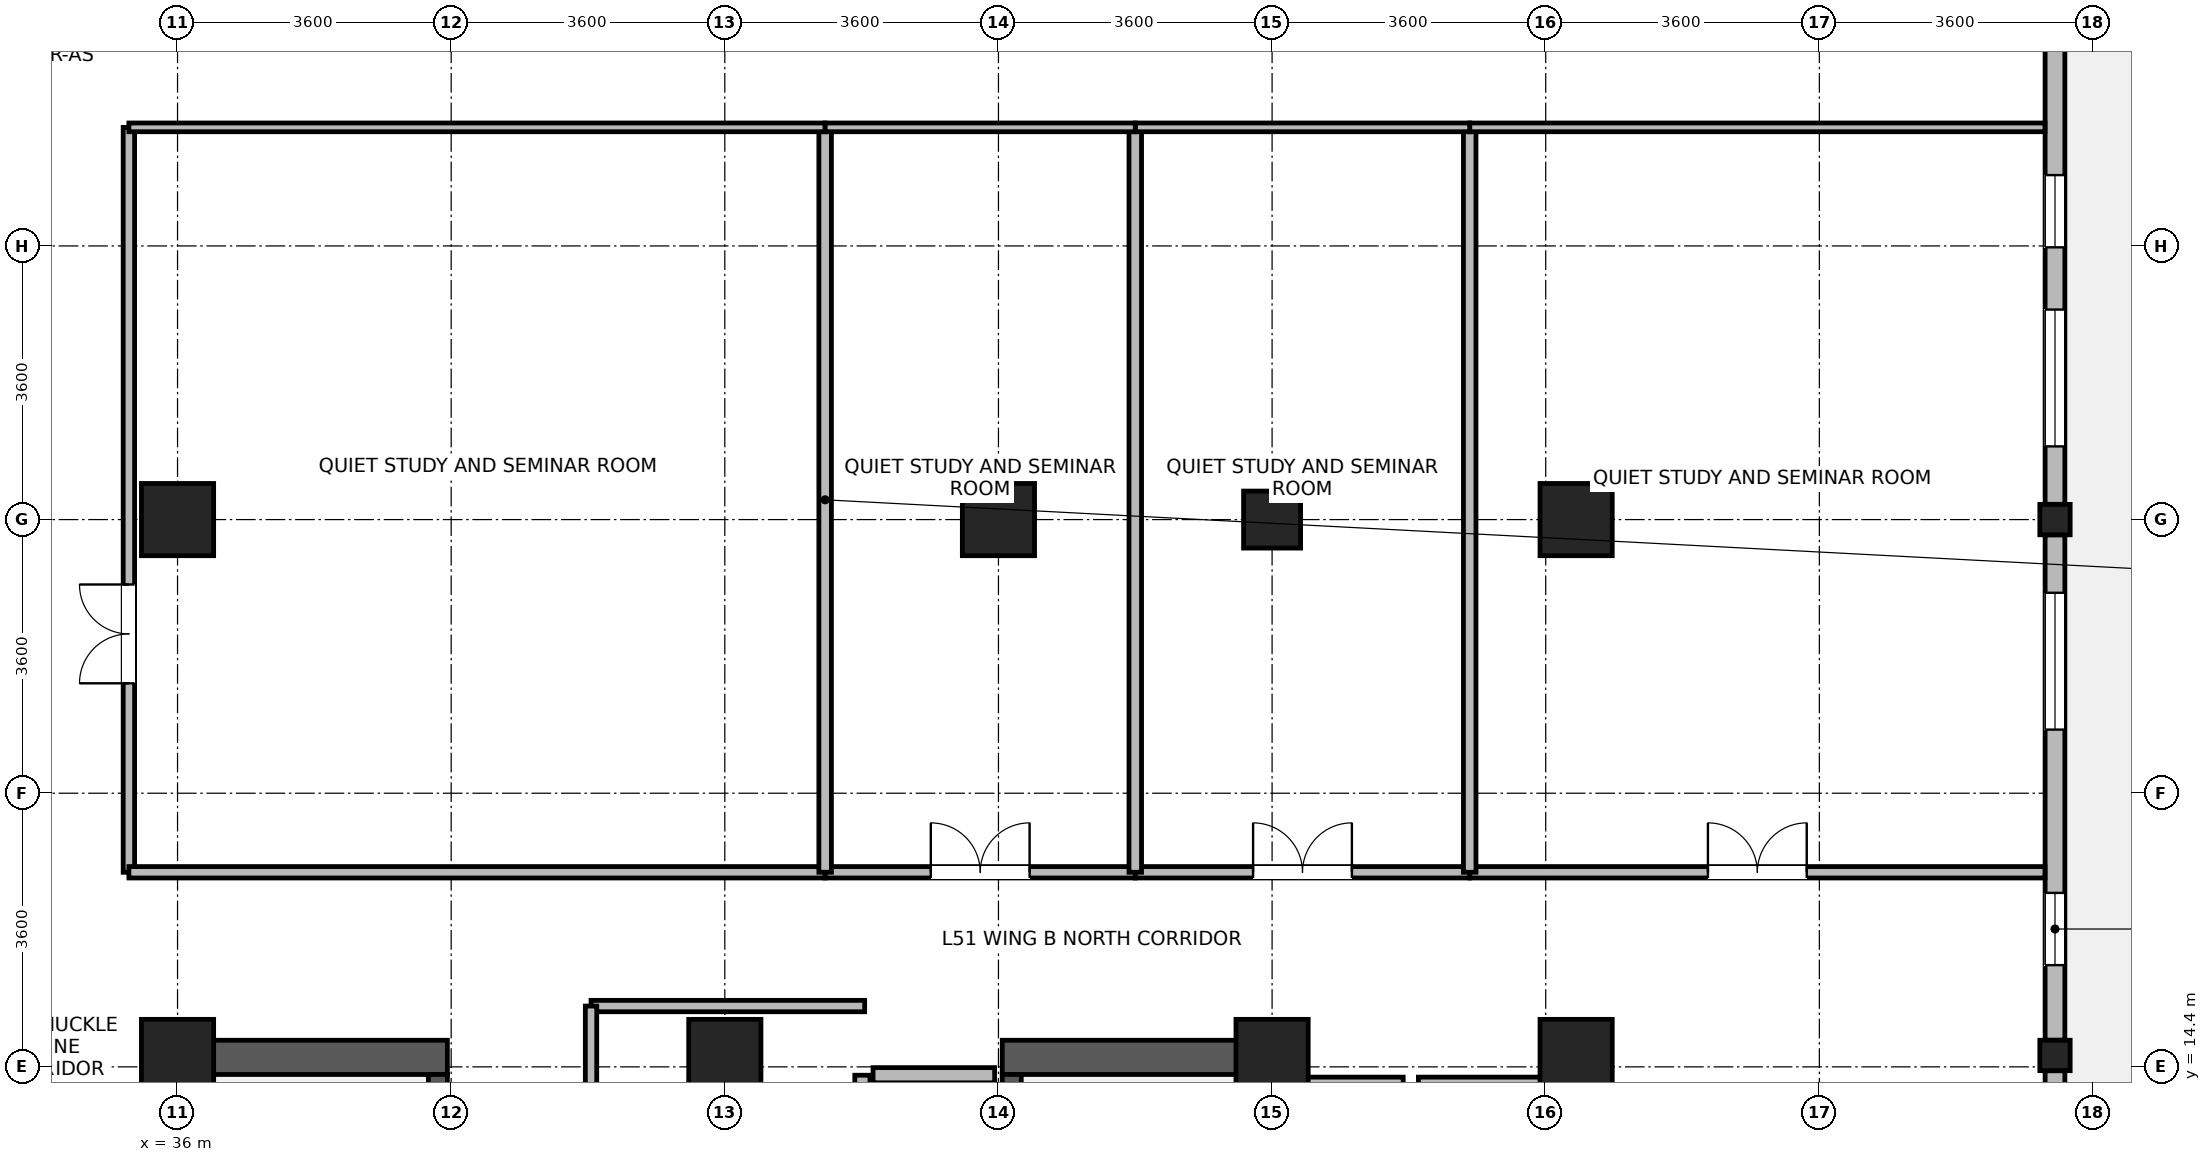
"""IFC4 building model, lengths in metres.
Left out: names, types, materials, properties, quantities, classifications, styles, units other than length and angle.
Written with IfcOpenShell. Run it as: python <this file> out.ifc"""

import sys

from ifc_helpers import new_model, si_unit, direction, frame, frame_2d, origin, origin_2d, place, context, subcontext, project, spatial, rectangle, i_section, extrude, source, transform, mapped, element, fill, save


model = new_model("IFC4")
c1 = context("Model", 3, precision=1e-05, world=origin(), true_north=direction((0.0, 1.0)))
c2 = subcontext(c1, "Body", "Model", "MODEL_VIEW")
j1 = project(units=[si_unit("LENGTHUNIT", "METRE"), si_unit("PLANEANGLEUNIT", "RADIAN")], contexts=[c1])
p1 = place(None, origin())
s1 = spatial("IfcSite", under=j1, at=p1, CompositionType="ELEMENT")
p2 = place(p1, origin())
s2 = spatial("IfcBuilding", under=s1, at=p2, CompositionType="ELEMENT")
p3 = place(p2, frame((0.0, 0.0, 201.8)))
s3 = spatial("IfcBuildingStorey", under=s2, at=p3, CompositionType="ELEMENT", Elevation=201.8)
for number, where, z_axis, x_axis in (
    (1, (36.125, 6.85, 0.0), (0.0, 0.0, 1.0), (0.0, 1.0, 0.0)),
    (2, (50.275, 6.85, 0.0), (0.0, 0.0, 1.0), (0.0, 1.0, 0.0)),
):
    element("IfcWall", number, at=place(p3, frame(where, z_axis=z_axis, x_axis=x_axis)), inside=s3, PredefinedType="SHEAR", context=c2, shape_type="SweptSolid", body=[
        extrude(rectangle(XDim=7.9, YDim=0.45, at=frame_2d((3.95, 0.0))), origin(), (0.0, 0.0, 1.0), 3.47),
    ])
for number, where, z_axis, x_axis in (
    (3, (36.35, 14.525, 0.0), (0.0, 0.0, 1.0), (1.0, 0.0, 0.0)),
    (4, (46.85, 14.525, 0.0), (0.0, 0.0, 1.0), (1.0, 0.0, 0.0)),
):
    element("IfcWall", number, at=place(p3, frame(where, z_axis=z_axis, x_axis=x_axis)), inside=s3, PredefinedType="SHEAR", context=c2, shape_type="SweptSolid", body=[
        extrude(rectangle(XDim=3.2, YDim=0.45, at=frame_2d((1.6, 0.0))), origin(), (0.0, 0.0, 1.0), 3.47),
    ])
p4 = place(p3, frame((39.425, 7.3, 0.0), z_axis=(0.0, 0.0, 1.0), x_axis=(0.0, 1.0, 0.0)))
e5 = element("IfcWall", 5, at=p4, inside=s3, PredefinedType="SHEAR", context=c2, shape_type="SweptSolid", body=[
    extrude(rectangle(XDim=7.0, YDim=0.25, at=frame_2d((3.5, 0.0))), origin(), (0.0, 0.0, 1.0), 3.47),
])
p5 = place(p4, frame((0.15, 0.0, 0.0)))
e6 = element("IfcOpeningElement", 6, at=p5, cuts=e5, PredefinedType="OPENING", context=c2, shape_type="SweptSolid", body=[
    extrude(rectangle(XDim=1.1, YDim=2.08, at=frame_2d((0.55, 1.04))), frame((0.0, 0.135, 0.0), z_axis=(0.0, -1.0, 0.0), x_axis=(1.0, 0.0, 0.0)), (0.0, 0.0, 1.0), 0.27),
])
p6 = place(p3, frame((46.975, 7.3, 0.0), z_axis=(0.0, 0.0, 1.0), x_axis=(0.0, 1.0, 0.0)))
e7 = element("IfcWall", 7, at=p6, inside=s3, PredefinedType="SHEAR", context=c2, shape_type="SweptSolid", body=[
    extrude(rectangle(XDim=7.0, YDim=0.25, at=frame_2d((3.5, 0.0))), origin(), (0.0, 0.0, 1.0), 3.47),
])
p7 = place(p6, frame((0.15, 0.0, 0.0)))
e8 = element("IfcOpeningElement", 8, at=p7, cuts=e7, PredefinedType="OPENING", context=c2, shape_type="SweptSolid", body=[
    extrude(rectangle(XDim=1.1, YDim=2.08, at=frame_2d((0.55, 1.04))), frame((0.0, 0.135, 0.0), z_axis=(0.0, -1.0, 0.0), x_axis=(1.0, 0.0, 0.0)), (0.0, 0.0, 1.0), 0.27),
])
m1 = source(origin(), c2, "Body", "SweptSolid", [
    extrude(rectangle(XDim=0.95, YDim=0.95, at=origin_2d()), origin(), (0.0, 0.0, 1.0), 3.7),
])
for number, where, z_axis, x_axis in (
    (9, (36.0, 21.6, 0.0), (0.0, 0.0, 1.0), (1.0, 0.0, 0.0)),
    (10, (46.8, 21.6, 0.0), (0.0, 0.0, 1.0), (1.0, 0.0, 0.0)),
    (11, (36.0, 14.55, 0.0), (0.0, 0.0, 1.0), (1.0, 0.0, 0.0)),
    (12, (43.2, 14.55, 0.0), (0.0, 0.0, 1.0), (1.0, 0.0, 0.0)),
    (13, (50.4, 14.55, 0.0), (0.0, 0.0, 1.0), (1.0, 0.0, 0.0)),
):
    element("IfcColumn", number, at=place(p3, frame(where, z_axis=z_axis, x_axis=x_axis)), inside=s3, PredefinedType="COLUMN", context=c2, shape_type="MappedRepresentation", body=[
        mapped(m1, transform((0.0, 0.0, 0.0), x_axis=(1.0, 0.0, 0.0), y_axis=(0.0, 1.0, 0.0), z_axis=(0.0, 0.0, 1.0), scale=1.0)),
    ])
m2 = source(origin(), c2, "Body", "SweptSolid", [
    extrude(rectangle(XDim=0.75, YDim=0.75, at=origin_2d()), origin(), (0.0, 0.0, 1.0), 3.7),
])
p8 = place(p3, frame((50.4, 21.6, 0.0), z_axis=(0.0, 0.0, 1.0), x_axis=(1.0, 0.0, 0.0)))
e14 = element("IfcColumn", 14, at=p8, inside=s3, PredefinedType="PILASTER", context=c2, shape_type="MappedRepresentation", body=[
    mapped(m2, transform((0.0, 0.0, 0.0), x_axis=(1.0, 0.0, 0.0), y_axis=(0.0, 1.0, 0.0), z_axis=(0.0, 0.0, 1.0), scale=1.0)),
])
for number, where, z_axis, x_axis in (
    (15, (54.4, 14.55, 0.0), (0.0, 0.0, 1.0), (1.0, 0.0, 0.0)),
    (16, (54.4, 21.6, 0.0), (0.0, 0.0, 1.0), (1.0, 0.0, 0.0)),
):
    element("IfcColumn", number, at=place(p3, frame(where, z_axis=z_axis, x_axis=x_axis)), inside=s3, PredefinedType="COLUMN", context=c2, shape_type="MappedRepresentation", body=[
        mapped(m1, transform((0.0, 0.0, 0.0), x_axis=(1.0, 0.0, 0.0), y_axis=(0.0, 1.0, 0.0), z_axis=(0.0, 0.0, 1.0), scale=1.0)),
    ])
m3 = source(origin(), c2, "Body", "SweptSolid", [
    extrude(i_section(OverallWidth=0.399, OverallDepth=0.4, WebThickness=0.017, FlangeThickness=0.023, FilletRadius=0.015, at=origin_2d()), origin(), (0.0, 0.0, 1.0), 3.7),
])
for number, where, z_axis, x_axis in (
    (17, (60.7, 14.55, 0.0), (0.0, 0.0, 1.0), (1.0, 0.0, 0.0)),
    (18, (60.7, 21.6, 0.0), (0.0, 0.0, 1.0), (1.0, 0.0, 0.0)),
):
    element("IfcColumn", number, at=place(p3, frame(where, z_axis=z_axis, x_axis=x_axis)), inside=s3, PredefinedType="COLUMN", context=c2, shape_type="MappedRepresentation", body=[
        mapped(m3, transform((0.0, 0.0, 0.0), x_axis=(1.0, 0.0, 0.0), y_axis=(0.0, 1.0, 0.0), z_axis=(0.0, 0.0, 1.0), scale=1.0)),
    ])
p9 = place(p3, frame((60.7, 14.349, 0.0), z_axis=(0.0, 0.0, 1.0), x_axis=(0.0, -1.0, 0.0)))
e19 = element("IfcWall", 19, at=p9, inside=s3, PredefinedType="STANDARD", context=c2, shape_type="SweptSolid", body=[
    extrude(rectangle(XDim=7.098, YDim=0.26, at=frame_2d((3.549, 0.0))), origin(), (0.0, 0.0, 1.0), 3.0),
])
p10 = place(p9, frame((2.799, 0.0, 0.0)))
e20 = element("IfcOpeningElement", 20, at=p10, cuts=e19, PredefinedType="OPENING", context=c2, shape_type="SweptSolid", body=[
    extrude(rectangle(XDim=1.5, YDim=2.15, at=frame_2d((0.75, 1.075))), frame((0.0, 0.14, 0.0), z_axis=(0.0, -1.0, 0.0), x_axis=(1.0, 0.0, 0.0)), (0.0, 0.0, 1.0), 0.28),
])
p11 = place(p3, frame((60.7, 21.399, 0.0), z_axis=(0.0, 0.0, 1.0), x_axis=(0.0, -1.0, 0.0)))
e21 = element("IfcWall", 21, at=p11, inside=s3, PredefinedType="STANDARD", context=c2, shape_type="SweptSolid", body=[
    extrude(rectangle(XDim=6.648, YDim=0.26, at=frame_2d((3.324, 0.0))), origin(), (0.0, 0.0, 1.0), 3.0),
])
p12 = place(p11, frame((0.762, 0.0, 0.85)))
e22 = element("IfcOpeningElement", 22, at=p12, cuts=e21, PredefinedType="OPENING", context=c2, shape_type="SweptSolid", body=[
    extrude(rectangle(XDim=1.8, YDim=1.85, at=frame_2d((0.9, 0.925))), frame((0.0, 0.14, 0.0), z_axis=(0.0, -1.0, 0.0), x_axis=(1.0, 0.0, 0.0)), (0.0, 0.0, 1.0), 0.28),
])
p13 = place(p11, frame((4.71, 0.0, 0.85)))
e23 = element("IfcOpeningElement", 23, at=p13, cuts=e21, PredefinedType="OPENING", context=c2, shape_type="SweptSolid", body=[
    extrude(rectangle(XDim=0.95, YDim=1.75, at=frame_2d((0.475, 0.875))), frame((0.0, 0.14, 0.0), z_axis=(0.0, -1.0, 0.0), x_axis=(1.0, 0.0, 0.0)), (0.0, 0.0, 1.0), 0.28),
])
p14 = place(p3, frame((60.7, 28.449, 0.0), z_axis=(0.0, 0.0, 1.0), x_axis=(0.0, -1.0, 0.0)))
e24 = element("IfcWall", 24, at=p14, inside=s3, PredefinedType="STANDARD", context=c2, shape_type="SweptSolid", body=[
    extrude(rectangle(XDim=6.648, YDim=0.26, at=frame_2d((3.324, 0.0))), origin(), (0.0, 0.0, 1.0), 3.0),
])
p15 = place(p14, frame((4.086, 0.0, 0.85)))
e25 = element("IfcOpeningElement", 25, at=p15, cuts=e24, PredefinedType="OPENING", context=c2, shape_type="SweptSolid", body=[
    extrude(rectangle(XDim=1.8, YDim=1.85, at=frame_2d((0.9, 0.925))), frame((0.0, 0.14, 0.0), z_axis=(0.0, -1.0, 0.0), x_axis=(1.0, 0.0, 0.0)), (0.0, 0.0, 1.0), 0.28),
])
p16 = place(p14, frame((2.317, 0.0, 0.85)))
e26 = element("IfcOpeningElement", 26, at=p16, cuts=e24, PredefinedType="OPENING", context=c2, shape_type="SweptSolid", body=[
    extrude(rectangle(XDim=0.95, YDim=1.75, at=frame_2d((0.475, 0.875))), frame((0.0, 0.14, 0.0), z_axis=(0.0, -1.0, 0.0), x_axis=(1.0, 0.0, 0.0)), (0.0, 0.0, 1.0), 0.28),
])
p17 = place(p3, frame((50.475, 14.165, 0.0), z_axis=(0.0, 0.0, 1.0), x_axis=(1.0, 0.0, 0.0)))
e27 = element("IfcWall", 27, at=p17, inside=s3, PredefinedType="PARTITIONING", context=c2, shape_type="SweptSolid", body=[
    extrude(rectangle(XDim=1.65, YDim=0.2, at=frame_2d((0.825, 0.0))), origin(), (0.0, 0.0, 1.0), 3.45),
])
p18 = place(p3, frame((52.325, 14.165, 0.0), z_axis=(0.0, 0.0, 1.0), x_axis=(1.0, 0.0, 0.0)))
e28 = element("IfcWall", 28, at=p18, inside=s3, PredefinedType="PARTITIONING", context=c2, shape_type="SweptSolid", body=[
    extrude(rectangle(XDim=1.65, YDim=0.2, at=frame_2d((0.825, 0.0))), origin(), (0.0, 0.0, 1.0), 3.45),
])
p19 = place(p3, frame((45.15, 14.29, 0.0), z_axis=(0.0, 0.0, 1.0), x_axis=(1.0, 0.0, 0.0)))
e29 = element("IfcWall", 29, at=p19, inside=s3, PredefinedType="PARTITIONING", context=c2, shape_type="SweptSolid", body=[
    extrude(rectangle(XDim=1.6, YDim=0.2, at=frame_2d((0.8, 0.0))), origin(), (0.0, 0.0, 1.0), 2.45),
])
p20 = place(p3, frame((45.01, 11.61, 0.0), z_axis=(0.0, 0.0, 1.0), x_axis=(0.0, 1.0, 0.0)))
e30 = element("IfcWall", 30, at=p20, inside=s3, PredefinedType="PARTITIONING", context=c2, shape_type="SweptSolid", body=[
    extrude(rectangle(XDim=2.68, YDim=0.2, at=frame_2d((1.34, 0.0))), origin(), (0.0, 0.0, 1.0), 3.45),
])
p21 = place(p3, frame((35.36, 16.96, 0.0), z_axis=(0.0, 0.0, 1.0), x_axis=(0.0, 1.0, 0.0)))
e31 = element("IfcWall", 31, at=p21, inside=s3, PredefinedType="PARTITIONING", context=c2, shape_type="SweptSolid", body=[
    extrude(rectangle(XDim=9.8, YDim=0.15, at=frame_2d((4.9, 0.0))), origin(), (0.0, 0.0, 1.0), 3.45),
])
p22 = place(p21, frame((2.486, 0.0, 0.0)))
e32 = element("IfcOpeningElement", 32, at=p22, cuts=e31, PredefinedType="OPENING", context=c2, shape_type="SweptSolid", body=[
    extrude(rectangle(XDim=1.3, YDim=2.12, at=frame_2d((0.65, 1.06))), frame((0.0, 0.085, 0.0), z_axis=(0.0, -1.0, 0.0), x_axis=(1.0, 0.0, 0.0)), (0.0, 0.0, 1.0), 0.17),
])
p23 = place(p3, frame((35.36, 16.96, 0.0), z_axis=(0.0, 0.0, 1.0), x_axis=(1.0, 0.0, 0.0)))
e33 = element("IfcWall", 33, at=p23, inside=s3, PredefinedType="PARTITIONING", context=c2, shape_type="SweptSolid", body=[
    extrude(rectangle(XDim=9.16, YDim=0.15, at=frame_2d((4.58, 0.0))), origin(), (0.0, 0.0, 1.0), 3.45),
])
p24 = place(p3, frame((53.0, 16.96, 0.0), z_axis=(0.0, 0.0, 1.0), x_axis=(1.0, 0.0, 0.0)))
e34 = element("IfcWall", 34, at=p24, inside=s3, PredefinedType="PARTITIONING", context=c2, shape_type="SweptSolid", body=[
    extrude(rectangle(XDim=7.568, YDim=0.15, at=frame_2d((3.784, 0.0))), origin(), (0.0, 0.0, 1.0), 3.45),
])
p25 = place(p24, frame((3.134, 0.0, 0.0)))
e35 = element("IfcOpeningElement", 35, at=p25, cuts=e34, PredefinedType="OPENING", context=c2, shape_type="SweptSolid", body=[
    extrude(rectangle(XDim=1.3, YDim=2.12, at=frame_2d((0.65, 1.06))), frame((0.0, 0.085, 0.0), z_axis=(0.0, -1.0, 0.0), x_axis=(1.0, 0.0, 0.0)), (0.0, 0.0, 1.0), 0.17),
])
p26 = place(p3, frame((48.6, 16.96, 0.0), z_axis=(0.0, 0.0, 1.0), x_axis=(1.0, 0.0, 0.0)))
e36 = element("IfcWall", 36, at=p26, inside=s3, PredefinedType="PARTITIONING", context=c2, shape_type="SweptSolid", body=[
    extrude(rectangle(XDim=4.4, YDim=0.15, at=frame_2d((2.2, 0.0))), origin(), (0.0, 0.0, 1.0), 3.45),
])
p27 = place(p26, frame((1.55, 0.0, 0.0)))
e37 = element("IfcOpeningElement", 37, at=p27, cuts=e36, PredefinedType="OPENING", context=c2, shape_type="SweptSolid", body=[
    extrude(rectangle(XDim=1.3, YDim=2.12, at=frame_2d((0.65, 1.06))), frame((0.0, 0.085, 0.0), z_axis=(0.0, -1.0, 0.0), x_axis=(1.0, 0.0, 0.0)), (0.0, 0.0, 1.0), 0.17),
])
p28 = place(p3, frame((44.52, 16.96, 0.0), z_axis=(0.0, 0.0, 1.0), x_axis=(1.0, 0.0, 0.0)))
e38 = element("IfcWall", 38, at=p28, inside=s3, PredefinedType="PARTITIONING", context=c2, shape_type="SweptSolid", body=[
    extrude(rectangle(XDim=4.08, YDim=0.15, at=frame_2d((2.04, 0.0))), origin(), (0.0, 0.0, 1.0), 3.45),
])
p29 = place(p28, frame((1.39, 0.0, 0.0)))
e39 = element("IfcOpeningElement", 39, at=p29, cuts=e38, PredefinedType="OPENING", context=c2, shape_type="SweptSolid", body=[
    extrude(rectangle(XDim=1.3, YDim=2.12, at=frame_2d((0.65, 1.06))), frame((0.0, 0.085, 0.0), z_axis=(0.0, -1.0, 0.0), x_axis=(1.0, 0.0, 0.0)), (0.0, 0.0, 1.0), 0.17),
])
p30 = place(p3, frame((41.44, 15.2, 0.0), z_axis=(0.0, 0.0, 1.0), x_axis=(1.0, 0.0, 0.0)))
e40 = element("IfcWall", 40, at=p30, inside=s3, PredefinedType="PARTITIONING", context=c2, shape_type="SweptSolid", body=[
    extrude(rectangle(XDim=3.6, YDim=0.15, at=frame_2d((1.8, 0.0))), origin(), (0.0, 0.0, 1.0), 3.45),
])
p31 = place(p3, frame((41.44, 11.64, 0.0), z_axis=(0.0, 0.0, 1.0), x_axis=(0.0, 1.0, 0.0)))
e41 = element("IfcWall", 41, at=p31, inside=s3, PredefinedType="PARTITIONING", context=c2, shape_type="SweptSolid", body=[
    extrude(rectangle(XDim=3.56, YDim=0.15, at=frame_2d((1.78, 0.0))), origin(), (0.0, 0.0, 1.0), 3.45),
])
for number, where, z_axis, x_axis in (
    (42, (44.52, 16.96, 0.0), (0.0, 0.0, 1.0), (0.0, 1.0, 0.0)),
    (43, (48.6, 16.96, 0.0), (0.0, 0.0, 1.0), (0.0, 1.0, 0.0)),
    (44, (53.0, 16.96, 0.0), (0.0, 0.0, 1.0), (0.0, 1.0, 0.0)),
):
    element("IfcWall", number, at=place(p3, frame(where, z_axis=z_axis, x_axis=x_axis)), inside=s3, PredefinedType="PARTITIONING", context=c2, shape_type="SweptSolid", body=[
        extrude(rectangle(XDim=9.8, YDim=0.165, at=frame_2d((4.9, 0.0))), origin(), (0.0, 0.0, 1.0), 3.45),
    ])
p32 = place(p3, frame((35.36, 26.76, 0.0), z_axis=(0.0, 0.0, 1.0), x_axis=(1.0, 0.0, 0.0)))
e45 = element("IfcWall", 45, at=p32, inside=s3, PredefinedType="PARTITIONING", context=c2, shape_type="SweptSolid", body=[
    extrude(rectangle(XDim=9.16, YDim=0.115, at=frame_2d((4.58, 0.0))), origin(), (0.0, 0.0, 1.0), 3.45),
])
p33 = place(p3, frame((53.0, 26.76, 0.0), z_axis=(0.0, 0.0, 1.0), x_axis=(1.0, 0.0, 0.0)))
e46 = element("IfcWall", 46, at=p33, inside=s3, PredefinedType="PARTITIONING", context=c2, shape_type="SweptSolid", body=[
    extrude(rectangle(XDim=7.568, YDim=0.115, at=frame_2d((3.784, 0.0))), origin(), (0.0, 0.0, 1.0), 3.45),
])
p34 = place(p3, frame((48.6, 26.76, 0.0), z_axis=(0.0, 0.0, 1.0), x_axis=(1.0, 0.0, 0.0)))
e47 = element("IfcWall", 47, at=p34, inside=s3, PredefinedType="PARTITIONING", context=c2, shape_type="SweptSolid", body=[
    extrude(rectangle(XDim=4.4, YDim=0.115, at=frame_2d((2.2, 0.0))), origin(), (0.0, 0.0, 1.0), 3.45),
])
p35 = place(p3, frame((44.52, 26.76, 0.0), z_axis=(0.0, 0.0, 1.0), x_axis=(1.0, 0.0, 0.0)))
e48 = element("IfcWall", 48, at=p35, inside=s3, PredefinedType="PARTITIONING", context=c2, shape_type="SweptSolid", body=[
    extrude(rectangle(XDim=4.08, YDim=0.115, at=frame_2d((2.04, 0.0))), origin(), (0.0, 0.0, 1.0), 3.45),
])
p36 = place(p12, origin())
e49 = element("IfcWindow", 49, at=p36, inside=s3, PartitioningType="SINGLE_PANEL", PredefinedType="WINDOW", context=c2, shape_type="SweptSolid", body=[
    extrude(rectangle(XDim=1.8, YDim=1.85, at=frame_2d((0.9, 0.925))), frame((0.0, 0.03, 0.0), z_axis=(0.0, -1.0, 0.0), x_axis=(1.0, 0.0, 0.0)), (0.0, 0.0, 1.0), 0.06),
])
fill(e22, e49)
p37 = place(p13, origin())
e50 = element("IfcWindow", 50, at=p37, inside=s3, PartitioningType="SINGLE_PANEL", PredefinedType="WINDOW", context=c2, shape_type="SweptSolid", body=[
    extrude(rectangle(XDim=0.95, YDim=1.75, at=frame_2d((0.475, 0.875))), frame((0.0, 0.03, 0.0), z_axis=(0.0, -1.0, 0.0), x_axis=(1.0, 0.0, 0.0)), (0.0, 0.0, 1.0), 0.06),
])
fill(e23, e50)
p38 = place(p15, origin())
e51 = element("IfcWindow", 51, at=p38, inside=s3, PartitioningType="SINGLE_PANEL", PredefinedType="WINDOW", context=c2, shape_type="SweptSolid", body=[
    extrude(rectangle(XDim=1.8, YDim=1.85, at=frame_2d((0.9, 0.925))), frame((0.0, 0.03, 0.0), z_axis=(0.0, -1.0, 0.0), x_axis=(1.0, 0.0, 0.0)), (0.0, 0.0, 1.0), 0.06),
])
fill(e25, e51)
p39 = place(p16, origin())
e52 = element("IfcWindow", 52, at=p39, inside=s3, PartitioningType="SINGLE_PANEL", PredefinedType="WINDOW", context=c2, shape_type="SweptSolid", body=[
    extrude(rectangle(XDim=0.95, YDim=1.75, at=frame_2d((0.475, 0.875))), frame((0.0, 0.03, 0.0), z_axis=(0.0, -1.0, 0.0), x_axis=(1.0, 0.0, 0.0)), (0.0, 0.0, 1.0), 0.06),
])
fill(e26, e52)
p40 = place(p22, origin())
e53 = element("IfcDoor", 53, at=p40, inside=s3, OperationType="DOUBLE_DOOR_SINGLE_SWING", PredefinedType="DOOR", context=c2, shape_type="SweptSolid", body=[
    extrude(rectangle(XDim=1.3, YDim=2.12, at=frame_2d((0.65, 1.06))), frame((0.0, 0.025, 0.0), z_axis=(0.0, -1.0, 0.0), x_axis=(1.0, 0.0, 0.0)), (0.0, 0.0, 1.0), 0.05),
])
fill(e32, e53)
p41 = place(p25, origin())
e54 = element("IfcDoor", 54, at=p41, inside=s3, OperationType="DOUBLE_DOOR_SINGLE_SWING", PredefinedType="DOOR", context=c2, shape_type="SweptSolid", body=[
    extrude(rectangle(XDim=1.3, YDim=2.12, at=frame_2d((0.65, 1.06))), frame((0.0, 0.025, 0.0), z_axis=(0.0, -1.0, 0.0), x_axis=(1.0, 0.0, 0.0)), (0.0, 0.0, 1.0), 0.05),
])
fill(e35, e54)
p42 = place(p27, origin())
e55 = element("IfcDoor", 55, at=p42, inside=s3, OperationType="DOUBLE_DOOR_SINGLE_SWING", PredefinedType="DOOR", context=c2, shape_type="SweptSolid", body=[
    extrude(rectangle(XDim=1.3, YDim=2.12, at=frame_2d((0.65, 1.06))), frame((0.0, 0.025, 0.0), z_axis=(0.0, -1.0, 0.0), x_axis=(1.0, 0.0, 0.0)), (0.0, 0.0, 1.0), 0.05),
])
fill(e37, e55)
p43 = place(p29, origin())
e56 = element("IfcDoor", 56, at=p43, inside=s3, OperationType="DOUBLE_DOOR_SINGLE_SWING", PredefinedType="DOOR", context=c2, shape_type="SweptSolid", body=[
    extrude(rectangle(XDim=1.3, YDim=2.12, at=frame_2d((0.65, 1.06))), frame((0.0, 0.025, 0.0), z_axis=(0.0, -1.0, 0.0), x_axis=(1.0, 0.0, 0.0)), (0.0, 0.0, 1.0), 0.05),
])
fill(e39, e56)
save(model, sys.argv[1])
